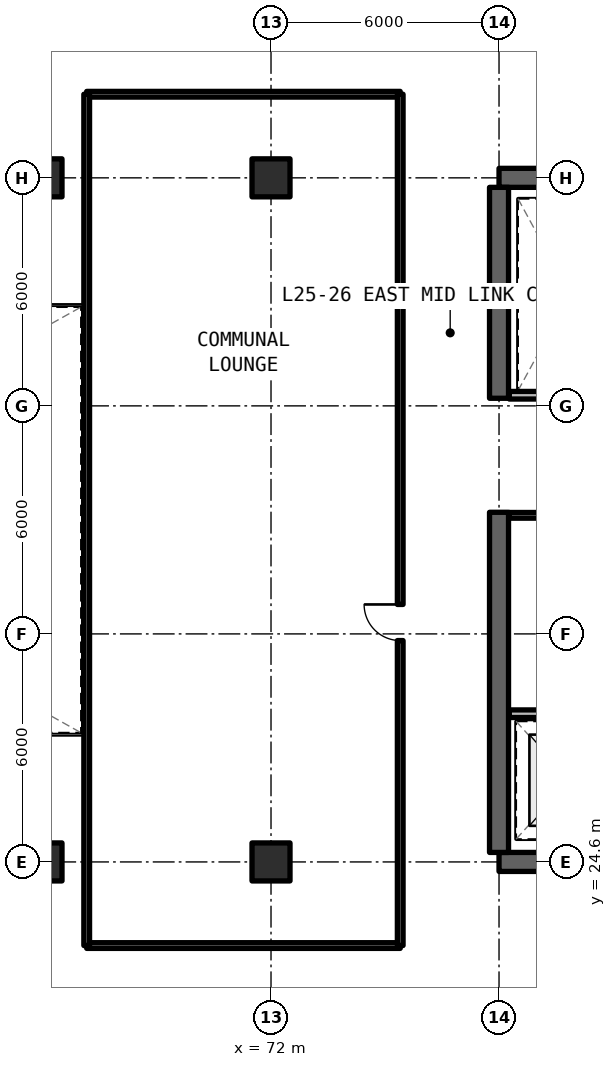
"""IFC4 building model, lengths in metres.
Left out: names, types, materials, properties, quantities, classifications, styles, units other than length and angle.
Written with IfcOpenShell. Run it as: python <this file> out.ifc"""

import sys

from ifc_helpers import new_model, si_unit, direction, frame, frame_2d, origin, origin_2d, place, context, subcontext, project, spatial, rectangle, extrude, element, fill, save


model = new_model("IFC4")
c1 = context("Model", 3, precision=1e-05, world=origin(), true_north=direction((0.0, 1.0)))
c2 = subcontext(c1, "Body", "Model", "MODEL_VIEW")
j1 = project(units=[si_unit("LENGTHUNIT", "METRE"), si_unit("PLANEANGLEUNIT", "RADIAN")], contexts=[c1])
p1 = place(None, origin())
s1 = spatial("IfcSite", under=j1, at=p1, CompositionType="ELEMENT")
p2 = place(p1, origin())
s2 = spatial("IfcBuilding", under=s1, at=p2, CompositionType="ELEMENT")
p3 = place(p2, frame((0.0, 0.0, 92.07)))
s3 = spatial("IfcBuildingStorey", under=s2, at=p3, CompositionType="ELEMENT", Elevation=92.07)
for number, where, z_axis, x_axis in (
    (1, (78.0, 24.6, 0.0), (0.0, 0.0, 1.0), (1.0, 0.0, 0.0)),
    (2, (90.0, 42.6, 0.0), (0.0, 0.0, 1.0), (-1.0, 0.0, 0.0)),
):
    element("IfcWall", number, at=place(p3, frame(where, z_axis=z_axis, x_axis=x_axis)), inside=s3, PredefinedType="SHEAR", context=c2, shape_type="SweptSolid", body=[
        extrude(rectangle(XDim=12.0, YDim=0.5, at=frame_2d((6.0, 0.0))), origin(), (0.0, 0.0, 1.0), 3.3),
    ])
p4 = place(p3, frame((78.0, 24.85, 0.0), z_axis=(0.0, 0.0, 1.0), x_axis=(0.0, 1.0, 0.0)))
e3 = element("IfcWall", 3, at=p4, inside=s3, PredefinedType="SHEAR", context=c2, shape_type="SweptSolid", body=[
    extrude(rectangle(XDim=8.95, YDim=0.5, at=frame_2d((4.475, 0.0))), origin(), (0.0, 0.0, 1.0), 3.3),
])
p5 = place(p3, frame((78.0, 36.8, 0.0), z_axis=(0.0, 0.0, 1.0), x_axis=(0.0, 1.0, 0.0)))
e4 = element("IfcWall", 4, at=p5, inside=s3, PredefinedType="SHEAR", context=c2, shape_type="SweptSolid", body=[
    extrude(rectangle(XDim=5.55, YDim=0.5, at=frame_2d((2.775, 0.0))), origin(), (0.0, 0.0, 1.0), 3.3),
])
for number, where, z_axis, x_axis in (
    (5, (66.0, 24.6, 0.0), (0.0, 0.0, 1.0), (1.0, 0.0, 0.0)),
    (6, (66.0, 42.6, 0.0), (0.0, 0.0, 1.0), (1.0, 0.0, 0.0)),
    (7, (72.0, 24.6, 0.0), (0.0, 0.0, 1.0), (1.0, 0.0, 0.0)),
    (8, (72.0, 42.6, 0.0), (0.0, 0.0, 1.0), (1.0, 0.0, 0.0)),
):
    element("IfcColumn", number, at=place(p3, frame(where, z_axis=z_axis, x_axis=x_axis)), inside=s3, PredefinedType="COLUMN", context=c2, shape_type="SweptSolid", body=[
        extrude(rectangle(XDim=1.0, YDim=1.0, at=origin_2d()), origin(), (0.0, 0.0, 1.0), 3.3),
    ])
p6 = place(p3, frame((78.27, 28.5, 0.0), z_axis=(0.0, 0.0, 1.0), x_axis=(1.0, 0.0, 0.0)))
e9 = element("IfcWall", 9, at=p6, inside=s3, PredefinedType="SOLIDWALL", context=c2, shape_type="SweptSolid", body=[
    extrude(rectangle(XDim=7.51, YDim=0.2, at=frame_2d((3.755, 0.0))), origin(), (0.0, 0.0, 1.0), 2.35),
])
p7 = place(p6, frame((3.53, 0.0, 0.0)))
e10 = element("IfcOpeningElement", 10, at=p7, cuts=e9, PredefinedType="OPENING", context=c2, shape_type="SweptSolid", body=[
    extrude(rectangle(XDim=1.0, YDim=2.15, at=frame_2d((0.5, 1.075))), frame((0.0, 0.11, 0.0), z_axis=(0.0, -1.0, 0.0), x_axis=(1.0, 0.0, 0.0)), (0.0, 0.0, 1.0), 0.22),
])
p8 = place(p3, frame((78.27, 33.72, 0.0), z_axis=(0.0, 0.0, 1.0), x_axis=(1.0, 0.0, 0.0)))
e11 = element("IfcWall", 11, at=p8, inside=s3, PredefinedType="SOLIDWALL", context=c2, shape_type="SweptSolid", body=[
    extrude(rectangle(XDim=3.05, YDim=0.15, at=frame_2d((1.525, 0.0))), origin(), (0.0, 0.0, 1.0), 2.35),
])
p9 = place(p3, frame((78.27, 36.88, 0.0), z_axis=(0.0, 0.0, 1.0), x_axis=(1.0, 0.0, 0.0)))
e12 = element("IfcWall", 12, at=p9, inside=s3, PredefinedType="SOLIDWALL", context=c2, shape_type="SweptSolid", body=[
    extrude(rectangle(XDim=3.05, YDim=0.2, at=frame_2d((1.525, 0.0))), origin(), (0.0, 0.0, 1.0), 2.35),
])
for number, where, z_axis, x_axis in (
    (13, (67.15, 22.4, 0.0), (0.0, 0.0, 1.0), (1.0, 0.0, 0.0)),
    (14, (67.15, 44.8, 0.0), (0.0, 0.0, 1.0), (1.0, 0.0, 0.0)),
):
    element("IfcWall", number, at=place(p3, frame(where, z_axis=z_axis, x_axis=x_axis)), inside=s3, PredefinedType="SOLIDWALL", context=c2, shape_type="SweptSolid", body=[
        extrude(rectangle(XDim=8.25, YDim=0.15, at=frame_2d((4.125, 0.0))), origin(), (0.0, 0.0, 1.0), 2.35),
    ])
p10 = place(p3, frame((67.15, 22.4, 0.0), z_axis=(0.0, 0.0, 1.0), x_axis=(0.0, 1.0, 0.0)))
e15 = element("IfcWall", 15, at=p10, inside=s3, PredefinedType="SOLIDWALL", context=c2, shape_type="SweptSolid", body=[
    extrude(rectangle(XDim=22.4, YDim=0.15, at=frame_2d((11.2, 0.0))), origin(), (0.0, 0.0, 1.0), 2.35),
])
p11 = place(p3, frame((75.4, 22.4, 0.0), z_axis=(0.0, 0.0, 1.0), x_axis=(0.0, 1.0, 0.0)))
e16 = element("IfcWall", 16, at=p11, inside=s3, PredefinedType="SOLIDWALL", context=c2, shape_type="SweptSolid", body=[
    extrude(rectangle(XDim=22.4, YDim=0.15, at=frame_2d((11.2, 0.0))), origin(), (0.0, 0.0, 1.0), 2.35),
])
p12 = place(p11, frame((8.025, 0.0, 0.0)))
e17 = element("IfcOpeningElement", 17, at=p12, cuts=e16, PredefinedType="OPENING", context=c2, shape_type="SweptSolid", body=[
    extrude(rectangle(XDim=0.95, YDim=2.15, at=frame_2d((0.475, 1.075))), frame((0.0, 0.085, 0.0), z_axis=(0.0, -1.0, 0.0), x_axis=(1.0, 0.0, 0.0)), (0.0, 0.0, 1.0), 0.17),
])
p13 = place(p12, origin())
e18 = element("IfcDoor", 18, at=p13, inside=s3, OperationType="SINGLE_SWING_RIGHT", PredefinedType="DOOR", context=c2, shape_type="SweptSolid", body=[
    extrude(rectangle(XDim=0.95, YDim=2.15, at=frame_2d((0.475, 1.075))), frame((0.0, 0.025, 0.0), z_axis=(0.0, -1.0, 0.0), x_axis=(1.0, 0.0, 0.0)), (0.0, 0.0, 1.0), 0.05),
])
fill(e17, e18)
save(model, sys.argv[1])
